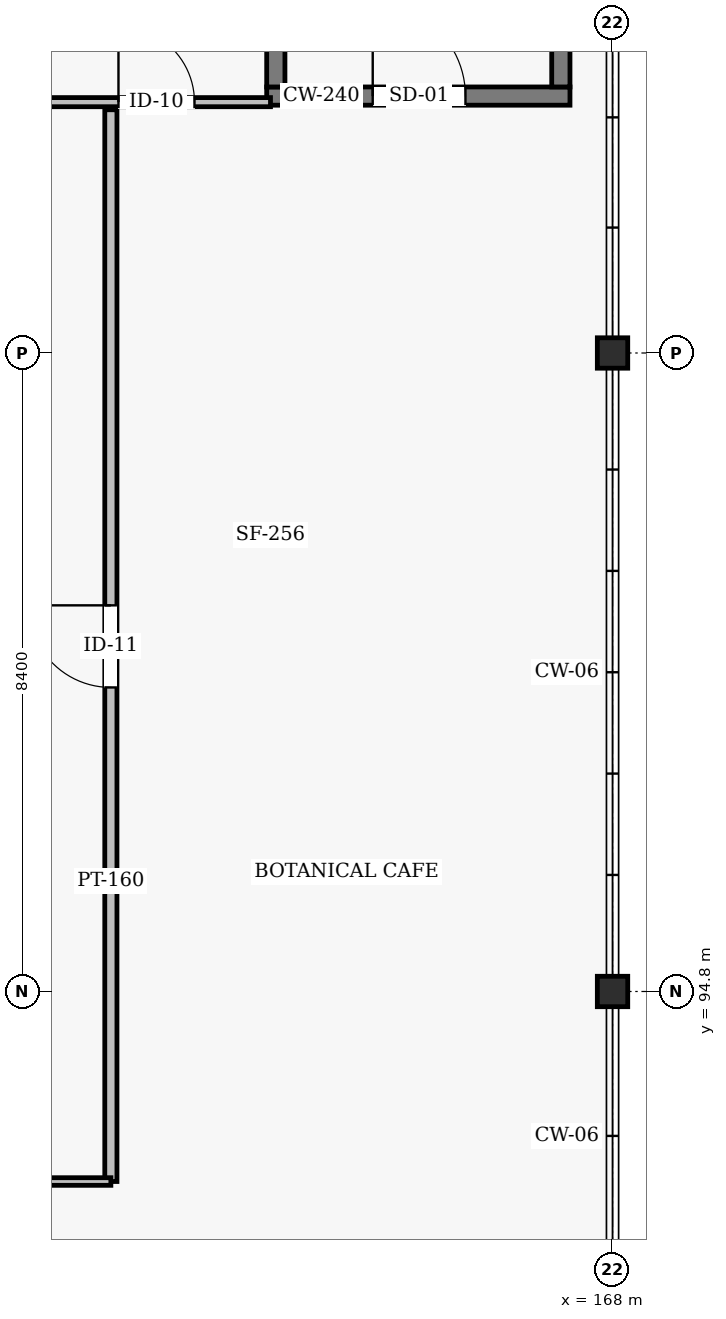
"""IFC4 building model, lengths in metres.
Left out: names, types, materials, properties, quantities, classifications, styles, units other than length and angle.
Written with IfcOpenShell. Run it as: python <this file> out.ifc"""

import sys

from ifc_helpers import new_model, si_unit, direction, frame, frame_2d, origin, origin_2d, place, context, subcontext, project, spatial, rectangle, hollow_rectangle, extrude, element, fill, save


model = new_model("IFC4")
c1 = context("Model", 3, precision=1e-05, world=origin(), true_north=direction((0.0, 1.0)))
c2 = subcontext(c1, "Body", "Model", "MODEL_VIEW")
j1 = project(units=[si_unit("LENGTHUNIT", "METRE"), si_unit("PLANEANGLEUNIT", "RADIAN")], contexts=[c1])
p1 = place(None, origin())
s1 = spatial("IfcSite", under=j1, at=p1, CompositionType="ELEMENT")
p2 = place(p1, origin())
s2 = spatial("IfcBuilding", under=s1, at=p2, CompositionType="ELEMENT")
p3 = place(p2, frame((0.0, 0.0, 57.6)))
s3 = spatial("IfcBuildingStorey", under=s2, at=p3, CompositionType="ELEMENT", Elevation=57.6)
for number, where, z_axis, x_axis in (
    (1, (168.0, 94.8, 0.0), (0.0, 0.0, 1.0), (1.0, 0.0, 0.0)),
    (2, (168.0, 103.2, 0.0), (0.0, 0.0, 1.0), (1.0, 0.0, 0.0)),
):
    element("IfcColumn", number, at=place(p3, frame(where, z_axis=z_axis, x_axis=x_axis)), inside=s3, PredefinedType="COLUMN", context=c2, shape_type="SweptSolid", body=[
        extrude(hollow_rectangle(XDim=0.4, YDim=0.4, WallThickness=0.016, InnerFilletRadius=0.016, OuterFilletRadius=0.032, at=origin_2d()), origin(), (0.0, 0.0, 1.0), 3.6),
    ])
p4 = place(p3, frame((163.45, 106.58, 0.0), z_axis=(0.0, 0.0, 1.0), x_axis=(1.0, 0.0, 0.0)))
e3 = element("IfcWall", 3, at=p4, inside=s3, PredefinedType="SHEAR", context=c2, shape_type="SweptSolid", body=[
    extrude(rectangle(XDim=3.99, YDim=0.24, at=frame_2d((1.995, 0.0))), origin(), (0.0, 0.0, 1.0), 3.33),
])
p5 = place(p4, frame((1.395, 0.0, 0.0)))
e4 = element("IfcOpeningElement", 4, at=p5, cuts=e3, PredefinedType="OPENING", context=c2, shape_type="SweptSolid", body=[
    extrude(rectangle(XDim=1.22, YDim=2.18, at=frame_2d((0.61, 1.09))), frame((0.0, 0.13, 0.0), z_axis=(0.0, -1.0, 0.0), x_axis=(1.0, 0.0, 0.0)), (0.0, 0.0, 1.0), 0.26),
])
for number, where, z_axis, x_axis in (
    (5, (163.57, 106.7, 0.0), (0.0, 0.0, 1.0), (0.0, 1.0, 0.0)),
    (6, (167.32, 106.7, 0.0), (0.0, 0.0, 1.0), (0.0, 1.0, 0.0)),
):
    element("IfcWall", number, at=place(p3, frame(where, z_axis=z_axis, x_axis=x_axis)), inside=s3, PredefinedType="SHEAR", context=c2, shape_type="SweptSolid", body=[
        extrude(rectangle(XDim=7.9, YDim=0.24, at=frame_2d((3.95, 0.0))), origin(), (0.0, 0.0, 1.0), 3.33),
    ])
p6 = place(p3, frame((160.5, 106.5, 0.0), z_axis=(0.0, 0.0, 1.0), x_axis=(1.0, 0.0, 0.0)))
e7 = element("IfcWall", 7, at=p6, inside=s3, PredefinedType="PARTITIONING", context=c2, shape_type="SweptSolid", body=[
    extrude(rectangle(XDim=3.0, YDim=0.12, at=frame_2d((1.5, 0.0))), origin(), (0.0, 0.0, 1.0), 3.33),
])
p7 = place(p6, frame((1.0, 0.0, 0.0)))
e8 = element("IfcOpeningElement", 8, at=p7, cuts=e7, PredefinedType="OPENING", context=c2, shape_type="SweptSolid", body=[
    extrude(rectangle(XDim=1.0, YDim=2.1, at=frame_2d((0.5, 1.05))), frame((0.0, 0.07, 0.0), z_axis=(0.0, -1.0, 0.0), x_axis=(1.0, 0.0, 0.0)), (0.0, 0.0, 1.0), 0.14),
])
p8 = place(p3, frame((161.4, 92.3, 0.0), z_axis=(0.0, 0.0, 1.0), x_axis=(0.0, 1.0, 0.0)))
e9 = element("IfcWall", 9, at=p8, inside=s3, PredefinedType="PARTITIONING", context=c2, shape_type="SweptSolid", body=[
    extrude(rectangle(XDim=14.1, YDim=0.16, at=frame_2d((7.05, 0.0))), origin(), (0.0, 0.0, 1.0), 2.734),
])
p9 = place(p8, frame((6.5, 0.0, 0.0)))
e10 = element("IfcOpeningElement", 10, at=p9, cuts=e9, PredefinedType="OPENING", context=c2, shape_type="SweptSolid", body=[
    extrude(rectangle(XDim=1.08, YDim=2.08, at=frame_2d((0.54, 1.04))), frame((0.0, 0.09, 0.0), z_axis=(0.0, -1.0, 0.0), x_axis=(1.0, 0.0, 0.0)), (0.0, 0.0, 1.0), 0.18),
])
p10 = place(p3, frame((141.9, 92.3, 0.0), z_axis=(0.0, 0.0, 1.0), x_axis=(1.0, 0.0, 0.0)))
e11 = element("IfcWall", 11, at=p10, inside=s3, PredefinedType="PARTITIONING", context=c2, shape_type="SweptSolid", body=[
    extrude(rectangle(XDim=19.5, YDim=0.1, at=frame_2d((9.75, 0.0))), origin(), (0.0, 0.0, 1.0), 2.83),
])
p11 = place(p10, frame((8.85, 0.0, 0.0)))
e12 = element("IfcOpeningElement", 12, at=p11, cuts=e11, PredefinedType="OPENING", context=c2, shape_type="SweptSolid", body=[
    extrude(rectangle(XDim=1.8, YDim=2.2, at=frame_2d((0.9, 1.1))), frame((0.0, 0.06, 0.0), z_axis=(0.0, -1.0, 0.0), x_axis=(1.0, 0.0, 0.0)), (0.0, 0.0, 1.0), 0.12),
])
p12 = place(p5, origin())
e13 = element("IfcDoor", 13, at=p12, inside=s3, OperationType="SINGLE_SWING_LEFT", PredefinedType="DOOR", context=c2, shape_type="SweptSolid", body=[
    extrude(rectangle(XDim=1.22, YDim=2.18, at=frame_2d((0.61, 1.09))), frame((0.0, 0.025, 0.0), z_axis=(0.0, -1.0, 0.0), x_axis=(1.0, 0.0, 0.0)), (0.0, 0.0, 1.0), 0.05),
])
fill(e4, e13)
p13 = place(p7, origin())
e14 = element("IfcDoor", 14, at=p13, inside=s3, OperationType="SINGLE_SWING_LEFT", PredefinedType="DOOR", context=c2, shape_type="SweptSolid", body=[
    extrude(rectangle(XDim=1.0, YDim=2.1, at=frame_2d((0.5, 1.05))), frame((0.0, 0.025, 0.0), z_axis=(0.0, -1.0, 0.0), x_axis=(1.0, 0.0, 0.0)), (0.0, 0.0, 1.0), 0.05),
])
fill(e8, e14)
p14 = place(p9, origin())
e15 = element("IfcDoor", 15, at=p14, inside=s3, OperationType="SINGLE_SWING_RIGHT", PredefinedType="DOOR", context=c2, shape_type="SweptSolid", body=[
    extrude(rectangle(XDim=1.08, YDim=2.08, at=frame_2d((0.54, 1.04))), frame((0.0, 0.025, 0.0), z_axis=(0.0, -1.0, 0.0), x_axis=(1.0, 0.0, 0.0)), (0.0, 0.0, 1.0), 0.05),
])
fill(e10, e15)
save(model, sys.argv[1])
